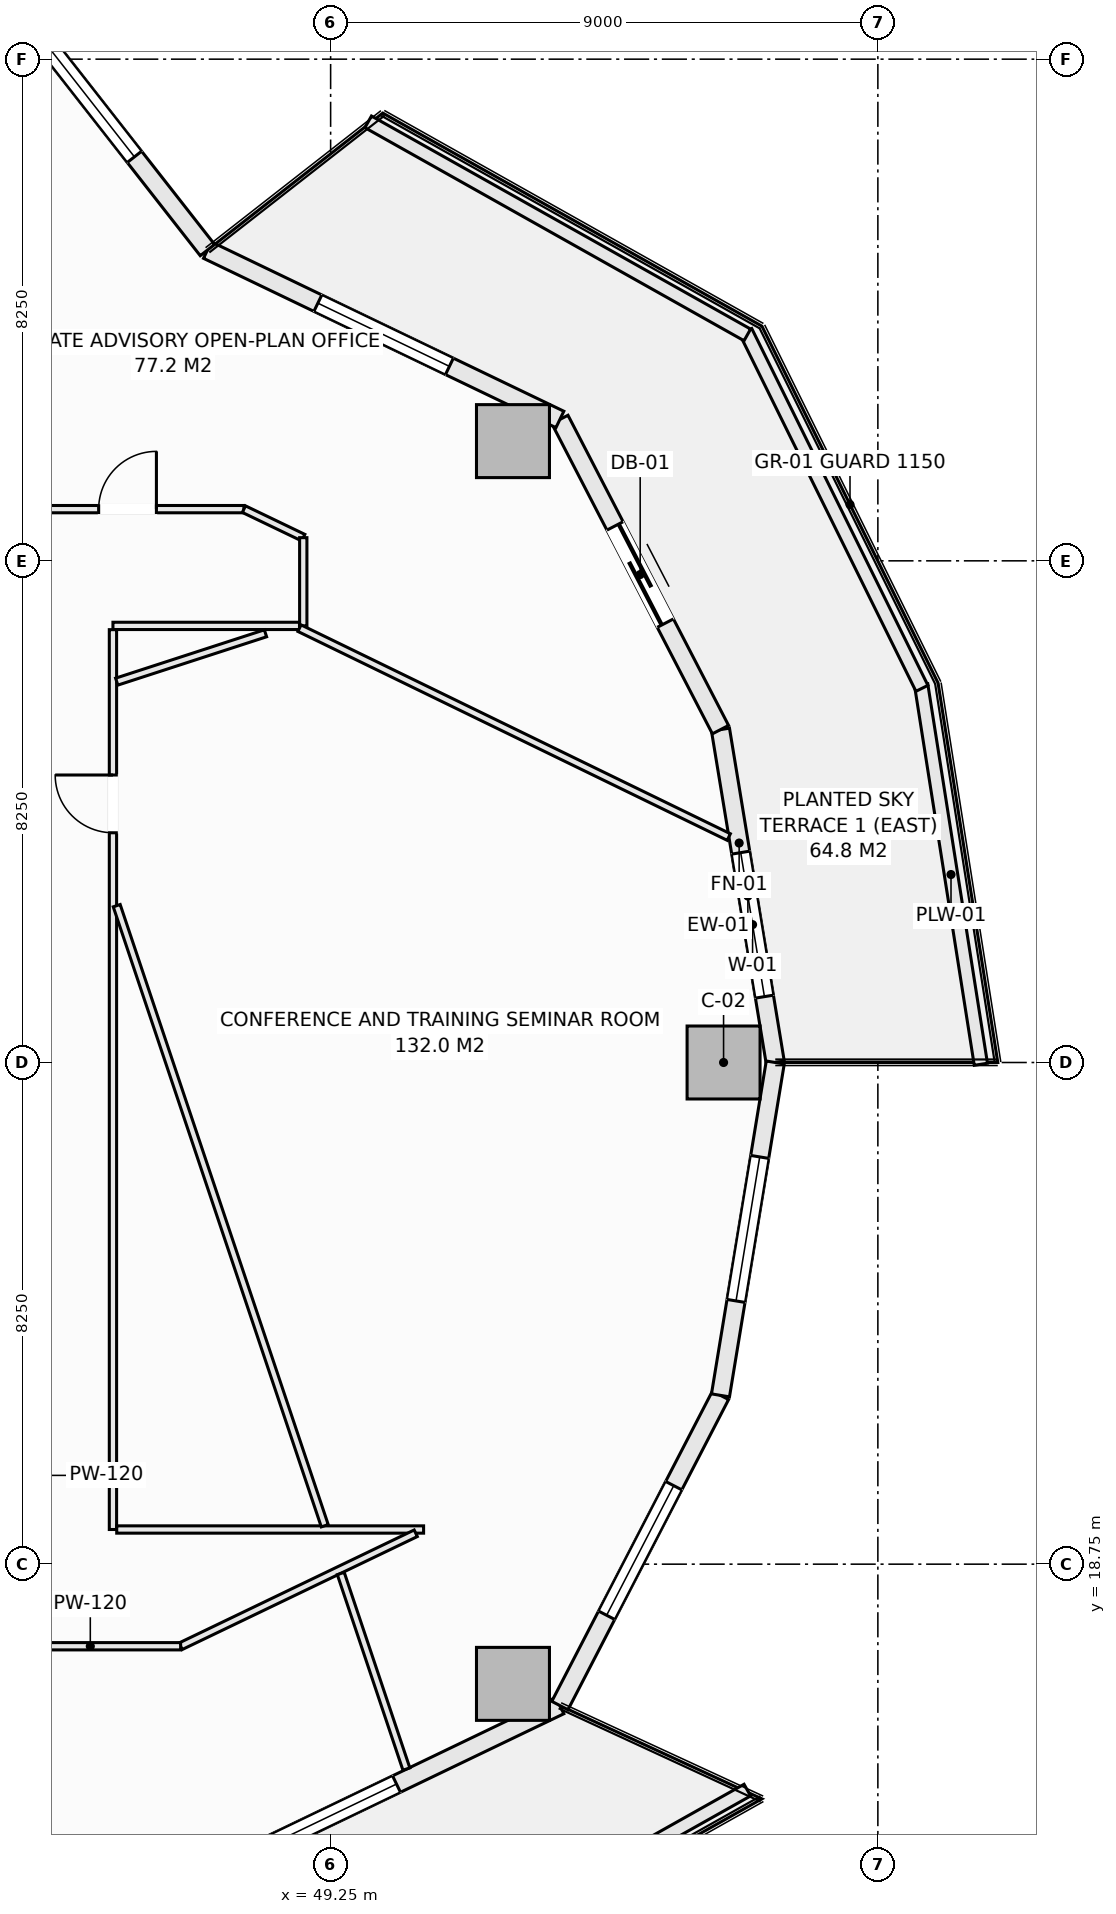
"""IFC4 building model, lengths in metres.
Left out: names, types, materials, properties, quantities, classifications, styles, units other than length and angle.
Written with IfcOpenShell. Run it as: python <this file> out.ifc"""

import sys

from ifc_helpers import new_model, si_unit, direction, frame, frame_2d, origin, origin_2d, place, context, subcontext, project, spatial, rectangle, extrude, element, fill, save


model = new_model("IFC4")
c1 = context("Model", 3, precision=1e-05, world=origin(), true_north=direction((0.0, 1.0)))
c2 = subcontext(c1, "Body", "Model", "MODEL_VIEW")
j1 = project(units=[si_unit("LENGTHUNIT", "METRE"), si_unit("PLANEANGLEUNIT", "RADIAN")], contexts=[c1])
p1 = place(None, origin())
s1 = spatial("IfcSite", under=j1, at=p1, CompositionType="ELEMENT")
p2 = place(p1, origin())
s2 = spatial("IfcBuilding", under=s1, at=p2, CompositionType="ELEMENT")
p3 = place(p2, frame((0.0, 0.0, 88.1)))
s3 = spatial("IfcBuildingStorey", under=s2, at=p3, CompositionType="ELEMENT", Elevation=88.1)
for number, where, z_axis, x_axis in (
    (1, (55.712, 27.0, -0.28), (0.0, 0.0, 1.0), (1.0, 0.0, 0.0)),
    (2, (52.249, 37.219, -0.28), (0.0, 0.0, 1.0), (1.0, 0.0, 0.0)),
    (3, (52.249, 16.781, -0.28), (0.0, 0.0, 1.0), (1.0, 0.0, 0.0)),
):
    element("IfcColumn", number, at=place(p3, frame(where, z_axis=z_axis, x_axis=x_axis)), inside=s3, PredefinedType="COLUMN", context=c2, shape_type="SweptSolid", body=[
        extrude(rectangle(XDim=1.2, YDim=1.2, at=origin_2d()), origin(), (0.0, 0.0, 1.0), 3.85),
    ])
p4 = place(p3, frame((55.662, 32.474, 0.0), z_axis=(0.0, 0.0, 1.0), x_axis=(0.162386212206, -0.986727276447, 0.0)))
e4 = element("IfcWall", 4, at=p4, inside=s3, PredefinedType="SOLIDWALL", context=c2, shape_type="SweptSolid", body=[
    extrude(rectangle(XDim=5.548, YDim=0.3, at=frame_2d((2.774, 0.0))), origin(), (0.0, 0.0, 1.0), 3.093),
])
p5 = place(p4, frame((2.05, 0.0, 0.85)))
e5 = element("IfcOpeningElement", 5, at=p5, cuts=e4, PredefinedType="OPENING", context=c2, shape_type="SweptSolid", body=[
    extrude(rectangle(XDim=2.4, YDim=1.9, at=frame_2d((1.2, 0.95))), frame((0.0, 0.16, 0.0), z_axis=(0.0, -1.0, 0.0), x_axis=(1.0, 0.0, 0.0)), (0.0, 0.0, 1.0), 0.32),
])
p6 = place(p3, frame((53.021, 37.575, 0.0), z_axis=(0.0, 0.0, 1.0), x_axis=(0.459800981414, -0.888021991558, 0.0)))
e6 = element("IfcWall", 6, at=p6, inside=s3, PredefinedType="SOLIDWALL", context=c2, shape_type="SweptSolid", body=[
    extrude(rectangle(XDim=5.744, YDim=0.3, at=frame_2d((2.872, 0.0))), origin(), (0.0, 0.0, 1.0), 3.093),
])
p7 = place(p6, frame((1.972, 0.0, 0.0)))
e7 = element("IfcOpeningElement", 7, at=p7, cuts=e6, PredefinedType="OPENING", context=c2, shape_type="SweptSolid", body=[
    extrude(rectangle(XDim=1.8, YDim=2.25, at=frame_2d((0.9, 1.125))), frame((0.0, 0.16, 0.0), z_axis=(0.0, -1.0, 0.0), x_axis=(1.0, 0.0, 0.0)), (0.0, 0.0, 1.0), 0.32),
])
p8 = place(p3, frame((47.224, 40.36, 0.0), z_axis=(0.0, 0.0, 1.0), x_axis=(0.901354747727, -0.433081538224, 0.0)))
e8 = element("IfcWall", 8, at=p8, inside=s3, PredefinedType="SOLIDWALL", context=c2, shape_type="SweptSolid", body=[
    extrude(rectangle(XDim=6.431, YDim=0.3, at=frame_2d((3.215, 0.0))), origin(), (0.0, 0.0, 1.0), 3.093),
])
p9 = place(p8, frame((2.015, 0.0, 0.85)))
e9 = element("IfcOpeningElement", 9, at=p9, cuts=e8, PredefinedType="OPENING", context=c2, shape_type="SweptSolid", body=[
    extrude(rectangle(XDim=2.4, YDim=1.9, at=frame_2d((1.2, 0.95))), frame((0.0, 0.16, 0.0), z_axis=(0.0, -1.0, 0.0), x_axis=(1.0, 0.0, 0.0)), (0.0, 0.0, 1.0), 0.32),
])
p10 = place(p3, frame((43.344, 45.316, 0.0), z_axis=(0.0, 0.0, 1.0), x_axis=(0.616434798832, -0.78740595552, 0.0)))
e10 = element("IfcWall", 10, at=p10, inside=s3, PredefinedType="SOLIDWALL", context=c2, shape_type="SweptSolid", body=[
    extrude(rectangle(XDim=6.294, YDim=0.3, at=frame_2d((3.147, 0.0))), origin(), (0.0, 0.0, 1.0), 3.093),
])
p11 = place(p10, frame((1.947, 0.0, 0.85)))
e11 = element("IfcOpeningElement", 11, at=p11, cuts=e10, PredefinedType="OPENING", context=c2, shape_type="SweptSolid", body=[
    extrude(rectangle(XDim=2.4, YDim=1.9, at=frame_2d((1.2, 0.95))), frame((0.0, 0.16, 0.0), z_axis=(0.0, -1.0, 0.0), x_axis=(1.0, 0.0, 0.0)), (0.0, 0.0, 1.0), 0.32),
])
p12 = place(p3, frame((47.224, 13.64, 0.0), z_axis=(0.0, 0.0, 1.0), x_axis=(0.901354747727, 0.433081538224, 0.0)))
e12 = element("IfcWall", 12, at=p12, inside=s3, PredefinedType="SOLIDWALL", context=c2, shape_type="SweptSolid", body=[
    extrude(rectangle(XDim=6.431, YDim=0.3, at=frame_2d((3.215, 0.0))), origin(), (0.0, 0.0, 1.0), 3.093),
])
p13 = place(p12, frame((1.05, 0.0, 0.85)))
e13 = element("IfcOpeningElement", 13, at=p13, cuts=e12, PredefinedType="OPENING", context=c2, shape_type="SweptSolid", body=[
    extrude(rectangle(XDim=2.4, YDim=1.9, at=frame_2d((1.2, 0.95))), frame((0.0, 0.16, 0.0), z_axis=(0.0, -1.0, 0.0), x_axis=(1.0, 0.0, 0.0)), (0.0, 0.0, 1.0), 0.32),
])
p14 = place(p3, frame((53.021, 16.425, 0.0), z_axis=(0.0, 0.0, 1.0), x_axis=(0.459800981414, 0.888021991558, 0.0)))
e14 = element("IfcWall", 14, at=p14, inside=s3, PredefinedType="SOLIDWALL", context=c2, shape_type="SweptSolid", body=[
    extrude(rectangle(XDim=5.744, YDim=0.3, at=frame_2d((2.872, 0.0))), origin(), (0.0, 0.0, 1.0), 3.093),
])
p15 = place(p14, frame((1.672, 0.0, 0.85)))
e15 = element("IfcOpeningElement", 15, at=p15, cuts=e14, PredefinedType="OPENING", context=c2, shape_type="SweptSolid", body=[
    extrude(rectangle(XDim=2.4, YDim=1.9, at=frame_2d((1.2, 0.95))), frame((0.0, 0.16, 0.0), z_axis=(0.0, -1.0, 0.0), x_axis=(1.0, 0.0, 0.0)), (0.0, 0.0, 1.0), 0.32),
])
p16 = place(p3, frame((55.662, 21.526, 0.0), z_axis=(0.0, 0.0, 1.0), x_axis=(0.162386212206, 0.986727276447, 0.0)))
e16 = element("IfcWall", 16, at=p16, inside=s3, PredefinedType="SOLIDWALL", context=c2, shape_type="SweptSolid", body=[
    extrude(rectangle(XDim=5.548, YDim=0.3, at=frame_2d((2.774, 0.0))), origin(), (0.0, 0.0, 1.0), 3.093),
])
p17 = place(p16, frame((1.574, 0.0, 0.85)))
e17 = element("IfcOpeningElement", 17, at=p17, cuts=e16, PredefinedType="OPENING", context=c2, shape_type="SweptSolid", body=[
    extrude(rectangle(XDim=2.4, YDim=1.9, at=frame_2d((1.2, 0.95))), frame((0.0, 0.16, 0.0), z_axis=(0.0, -1.0, 0.0), x_axis=(1.0, 0.0, 0.0)), (0.0, 0.0, 1.0), 0.32),
])
p18 = place(p3, frame((58.962, 33.212, 0.0), z_axis=(0.0, 0.0, 1.0), x_axis=(0.15545655238, -0.987842730561, 0.0)))
e18 = element("IfcWall", 18, at=p18, inside=s3, PredefinedType="PARAPET", context=c2, shape_type="SweptSolid", body=[
    extrude(rectangle(XDim=6.318, YDim=0.22, at=frame_2d((3.159, 0.0))), origin(), (0.0, 0.0, 1.0), 0.52),
])
p19 = place(p3, frame((56.077, 39.021, 0.0), z_axis=(0.0, 0.0, 1.0), x_axis=(0.442686636348, -0.89667638644, 0.0)))
e19 = element("IfcWall", 19, at=p19, inside=s3, PredefinedType="PARAPET", context=c2, shape_type="SweptSolid", body=[
    extrude(rectangle(XDim=6.545, YDim=0.22, at=frame_2d((3.272, 0.0))), origin(), (0.0, 0.0, 1.0), 0.52),
])
for number, where, z_axis, x_axis in (
    (20, (49.868, 42.469, 0.0), (0.0, 0.0, 1.0), (0.872, -0.49, 0.0)),
    (21, (49.868, 11.531, 0.0), (0.0, 0.0, 1.0), (0.872, 0.49, 0.0)),
):
    element("IfcWall", number, at=place(p3, frame(where, z_axis=z_axis, x_axis=x_axis)), inside=s3, PredefinedType="PARAPET", context=c2, shape_type="SweptSolid", body=[
        extrude(rectangle(XDim=7.152, YDim=0.22, at=frame_2d((3.576, 0.0))), origin(), (0.0, 0.0, 1.0), 0.52),
    ])
p20 = place(p3, frame((43.812, 36.1, 0.0), z_axis=(0.0, 0.0, 1.0), x_axis=(1.0, 0.0, 0.0)))
e22 = element("IfcWall", 22, at=p20, inside=s3, PredefinedType="PARTITIONING", context=c2, shape_type="SweptSolid", body=[
    extrude(rectangle(XDim=4.012, YDim=0.12, at=frame_2d((2.006, 0.0))), origin(), (0.0, 0.0, 1.0), 3.57),
])
p21 = place(p20, frame((1.623, 0.0, 0.0)))
e23 = element("IfcOpeningElement", 23, at=p21, cuts=e22, PredefinedType="OPENING", context=c2, shape_type="SweptSolid", body=[
    extrude(rectangle(XDim=0.95, YDim=2.1, at=frame_2d((0.475, 1.05))), frame((0.0, 0.07, 0.0), z_axis=(0.0, -1.0, 0.0), x_axis=(1.0, 0.0, 0.0)), (0.0, 0.0, 1.0), 0.14),
])
p22 = place(p3, frame((47.824, 36.1, 0.0), z_axis=(0.0, 0.0, 1.0), x_axis=(0.901350599951, -0.433090170712, 0.0)))
e24 = element("IfcWall", 24, at=p22, inside=s3, PredefinedType="PARTITIONING", context=c2, shape_type="SweptSolid", body=[
    extrude(rectangle(XDim=1.083, YDim=0.12, at=frame_2d((0.542, 0.0))), origin(), (0.0, 0.0, 1.0), 3.57),
])
p23 = place(p3, frame((48.8, 34.18, 0.0), z_axis=(0.0, 0.0, 1.0), x_axis=(0.0, 1.0, 0.0)))
e25 = element("IfcWall", 25, at=p23, inside=s3, PredefinedType="PARTITIONING", context=c2, shape_type="SweptSolid", body=[
    extrude(rectangle(XDim=1.451, YDim=0.12, at=frame_2d((0.726, 0.0))), origin(), (0.0, 0.0, 1.0), 3.57),
])
p24 = place(p3, frame((45.67, 34.18, 0.0), z_axis=(0.0, 0.0, 1.0), x_axis=(1.0, 0.0, 0.0)))
e26 = element("IfcWall", 26, at=p24, inside=s3, PredefinedType="PARTITIONING", context=c2, shape_type="SweptSolid", body=[
    extrude(rectangle(XDim=3.068, YDim=0.12, at=frame_2d((1.534, 0.0))), origin(), (0.0, 0.0, 1.0), 3.205),
])
p25 = place(p3, frame((45.67, 19.32, 0.0), z_axis=(0.0, 0.0, 1.0), x_axis=(0.0, 1.0, 0.0)))
e27 = element("IfcWall", 27, at=p25, inside=s3, PredefinedType="PARTITIONING", context=c2, shape_type="SweptSolid", body=[
    extrude(rectangle(XDim=14.798, YDim=0.12, at=frame_2d((7.399, 0.0))), origin(), (0.0, 0.0, 1.0), 3.57),
])
p26 = place(p25, frame((11.458, 0.0, 0.0)))
e28 = element("IfcOpeningElement", 28, at=p26, cuts=e27, PredefinedType="OPENING", context=c2, shape_type="SweptSolid", body=[
    extrude(rectangle(XDim=0.95, YDim=2.1, at=frame_2d((0.475, 1.05))), frame((0.0, 0.07, 0.0), z_axis=(0.0, -1.0, 0.0), x_axis=(1.0, 0.0, 0.0)), (0.0, 0.0, 1.0), 0.14),
])
p27 = place(p3, frame((45.732, 19.32, 0.0), z_axis=(0.0, 0.0, 1.0), x_axis=(1.0, 0.0, 0.0)))
e29 = element("IfcWall", 29, at=p27, inside=s3, PredefinedType="PARTITIONING", context=c2, shape_type="SweptSolid", body=[
    extrude(rectangle(XDim=5.047, YDim=0.12, at=frame_2d((2.523, 0.0))), origin(), (0.0, 0.0, 1.0), 3.205),
])
p28 = place(p3, frame((46.783, 17.4, 0.0), z_axis=(0.0, 0.0, 1.0), x_axis=(0.901339159108, 0.433113980679, 0.0)))
e30 = element("IfcWall", 30, at=p28, inside=s3, PredefinedType="PARTITIONING", context=c2, shape_type="SweptSolid", body=[
    extrude(rectangle(XDim=4.29, YDim=0.12, at=frame_2d((2.145, 0.0))), origin(), (0.0, 0.0, 1.0), 3.57),
])
p29 = place(p3, frame((43.812, 17.4, 0.0), z_axis=(0.0, 0.0, 1.0), x_axis=(1.0, 0.0, 0.0)))
e31 = element("IfcWall", 31, at=p29, inside=s3, PredefinedType="PARTITIONING", context=c2, shape_type="SweptSolid", body=[
    extrude(rectangle(XDim=2.971, YDim=0.12, at=frame_2d((1.485, 0.0))), origin(), (0.0, 0.0, 1.0), 3.57),
])
p30 = place(p3, frame((45.732, 29.579, 0.0), z_axis=(0.0, 0.0, 1.0), x_axis=(0.318099793934, -0.948057235139, 0.0)))
e32 = element("IfcWall", 32, at=p30, inside=s3, PredefinedType="PARTITIONING", context=c2, shape_type="SweptSolid", body=[
    extrude(rectangle(XDim=10.756, YDim=0.12, at=frame_2d((5.378, 0.0))), origin(), (0.0, 0.0, 1.0), 3.57),
])
p31 = place(p3, frame((49.417, 18.597, 0.0), z_axis=(0.0, 0.0, 1.0), x_axis=(0.318105552227, -0.948055303051, 0.0)))
e33 = element("IfcWall", 33, at=p31, inside=s3, PredefinedType="PARTITIONING", context=c2, shape_type="SweptSolid", body=[
    extrude(rectangle(XDim=3.392, YDim=0.12, at=frame_2d((1.696, 0.0))), origin(), (0.0, 0.0, 1.0), 3.57),
])
p32 = place(p3, frame((45.732, 33.263, 0.0), z_axis=(0.0, 0.0, 1.0), x_axis=(0.951057081836, 0.309015253813, 0.0)))
e34 = element("IfcWall", 34, at=p32, inside=s3, PredefinedType="PARTITIONING", context=c2, shape_type="SweptSolid", body=[
    extrude(rectangle(XDim=2.573, YDim=0.12, at=frame_2d((1.286, 0.0))), origin(), (0.0, 0.0, 1.0), 3.57),
])
p33 = place(p3, frame((48.738, 34.143, 0.0), z_axis=(0.0, 0.0, 1.0), x_axis=(0.899231452107, -0.437473194083, 0.0)))
e35 = element("IfcWall", 35, at=p33, inside=s3, PredefinedType="PARTITIONING", context=c2, shape_type="SweptSolid", body=[
    extrude(rectangle(XDim=7.852, YDim=0.12, at=frame_2d((3.926, 0.0))), origin(), (0.0, 0.0, 1.0), 3.57),
])
p34 = place(p5, origin())
e36 = element("IfcWindow", 36, at=p34, inside=s3, PartitioningType="SINGLE_PANEL", PredefinedType="WINDOW", context=c2, shape_type="SweptSolid", body=[
    extrude(rectangle(XDim=2.4, YDim=1.9, at=frame_2d((1.2, 0.95))), frame((0.0, 0.03, 0.0), z_axis=(0.0, -1.0, 0.0), x_axis=(1.0, 0.0, 0.0)), (0.0, 0.0, 1.0), 0.06),
])
fill(e5, e36)
p35 = place(p7, origin())
e37 = element("IfcDoor", 37, at=p35, inside=s3, OperationType="SLIDING_TO_LEFT", PredefinedType="DOOR", context=c2, shape_type="SweptSolid", body=[
    extrude(rectangle(XDim=1.8, YDim=2.25, at=frame_2d((0.9, 1.125))), frame((0.0, 0.025, 0.0), z_axis=(0.0, -1.0, 0.0), x_axis=(1.0, 0.0, 0.0)), (0.0, 0.0, 1.0), 0.05),
])
fill(e7, e37)
p36 = place(p9, origin())
e38 = element("IfcWindow", 38, at=p36, inside=s3, PartitioningType="SINGLE_PANEL", PredefinedType="WINDOW", context=c2, shape_type="SweptSolid", body=[
    extrude(rectangle(XDim=2.4, YDim=1.9, at=frame_2d((1.2, 0.95))), frame((0.0, 0.03, 0.0), z_axis=(0.0, -1.0, 0.0), x_axis=(1.0, 0.0, 0.0)), (0.0, 0.0, 1.0), 0.06),
])
fill(e9, e38)
p37 = place(p11, origin())
e39 = element("IfcWindow", 39, at=p37, inside=s3, PartitioningType="SINGLE_PANEL", PredefinedType="WINDOW", context=c2, shape_type="SweptSolid", body=[
    extrude(rectangle(XDim=2.4, YDim=1.9, at=frame_2d((1.2, 0.95))), frame((0.0, 0.03, 0.0), z_axis=(0.0, -1.0, 0.0), x_axis=(1.0, 0.0, 0.0)), (0.0, 0.0, 1.0), 0.06),
])
fill(e11, e39)
p38 = place(p13, origin())
e40 = element("IfcWindow", 40, at=p38, inside=s3, PartitioningType="SINGLE_PANEL", PredefinedType="WINDOW", context=c2, shape_type="SweptSolid", body=[
    extrude(rectangle(XDim=2.4, YDim=1.9, at=frame_2d((1.2, 0.95))), frame((0.0, 0.03, 0.0), z_axis=(0.0, -1.0, 0.0), x_axis=(1.0, 0.0, 0.0)), (0.0, 0.0, 1.0), 0.06),
])
fill(e13, e40)
p39 = place(p15, origin())
e41 = element("IfcWindow", 41, at=p39, inside=s3, PartitioningType="SINGLE_PANEL", PredefinedType="WINDOW", context=c2, shape_type="SweptSolid", body=[
    extrude(rectangle(XDim=2.4, YDim=1.9, at=frame_2d((1.2, 0.95))), frame((0.0, 0.03, 0.0), z_axis=(0.0, -1.0, 0.0), x_axis=(1.0, 0.0, 0.0)), (0.0, 0.0, 1.0), 0.06),
])
fill(e15, e41)
p40 = place(p17, origin())
e42 = element("IfcWindow", 42, at=p40, inside=s3, PartitioningType="SINGLE_PANEL", PredefinedType="WINDOW", context=c2, shape_type="SweptSolid", body=[
    extrude(rectangle(XDim=2.4, YDim=1.9, at=frame_2d((1.2, 0.95))), frame((0.0, 0.03, 0.0), z_axis=(0.0, -1.0, 0.0), x_axis=(1.0, 0.0, 0.0)), (0.0, 0.0, 1.0), 0.06),
])
fill(e17, e42)
p41 = place(p26, origin())
e43 = element("IfcDoor", 43, at=p41, inside=s3, OperationType="SINGLE_SWING_RIGHT", PredefinedType="DOOR", context=c2, shape_type="SweptSolid", body=[
    extrude(rectangle(XDim=0.95, YDim=2.1, at=frame_2d((0.475, 1.05))), frame((0.0, 0.025, 0.0), z_axis=(0.0, -1.0, 0.0), x_axis=(1.0, 0.0, 0.0)), (0.0, 0.0, 1.0), 0.05),
])
fill(e28, e43)
p42 = place(p21, origin())
e44 = element("IfcDoor", 44, at=p42, inside=s3, OperationType="SINGLE_SWING_RIGHT", PredefinedType="DOOR", context=c2, shape_type="SweptSolid", body=[
    extrude(rectangle(XDim=0.95, YDim=2.1, at=frame_2d((0.475, 1.05))), frame((0.0, 0.025, 0.0), z_axis=(0.0, -1.0, 0.0), x_axis=(1.0, 0.0, 0.0)), (0.0, 0.0, 1.0), 0.05),
])
fill(e23, e44)
save(model, sys.argv[1])
